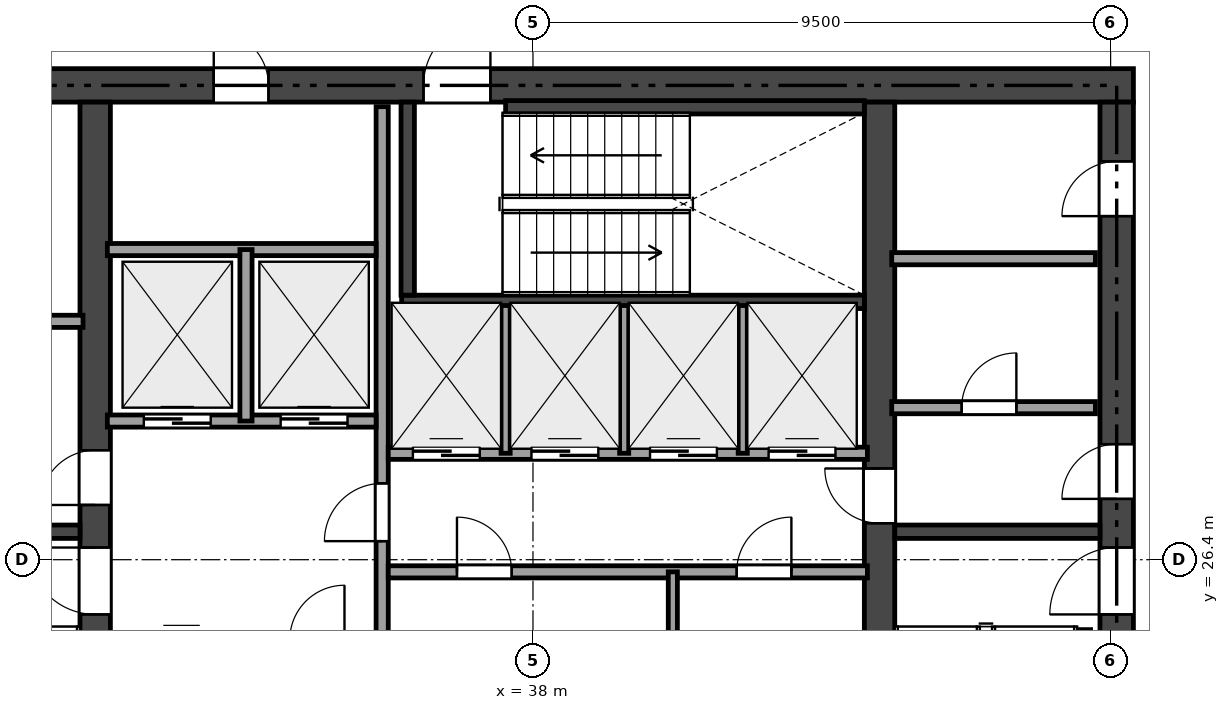
"""IFC4 building model, lengths in metres.
Left out: names, types, materials, properties, quantities, classifications, styles, units other than length and angle.
Written with IfcOpenShell. Run it as: python <this file> out.ifc"""

import sys

from ifc_helpers import new_model, si_unit, direction, frame, frame_2d, origin, place, context, subcontext, project, spatial, rectangle, extrude, element, fill, save


model = new_model("IFC4")
c1 = context("Model", 3, precision=1e-05, world=origin(), true_north=direction((0.0, 1.0)))
c2 = subcontext(c1, "Body", "Model", "MODEL_VIEW")
j1 = project(units=[si_unit("LENGTHUNIT", "METRE"), si_unit("PLANEANGLEUNIT", "RADIAN")], contexts=[c1])
p1 = place(None, origin())
s1 = spatial("IfcSite", under=j1, at=p1, CompositionType="ELEMENT")
p2 = place(p1, origin())
s2 = spatial("IfcBuilding", under=s1, at=p2, CompositionType="ELEMENT")
p3 = place(p2, frame((0.0, 0.0, 279.3)))
s3 = spatial("IfcBuildingStorey", under=s2, at=p3, CompositionType="ELEMENT", Elevation=279.3)
p4 = place(p3, frame((26.525, 34.2, 0.0), z_axis=(0.0, 0.0, 1.0), x_axis=(1.0, 0.0, 0.0)))
e1 = element("IfcWall", 1, at=p4, inside=s3, PredefinedType="SHEAR", context=c2, shape_type="SweptSolid", body=[
    extrude(rectangle(XDim=21.35, YDim=0.55, at=frame_2d((10.675, 0.0))), origin(), (0.0, 0.0, 1.0), 3.84),
])
p5 = place(p4, frame((9.675, 0.0, 0.0)))
e2 = element("IfcOpeningElement", 2, at=p5, cuts=e1, PredefinedType="OPENING", context=c2, shape_type="SweptSolid", body=[
    extrude(rectangle(XDim=1.1, YDim=2.15, at=frame_2d((0.55, 1.075))), frame((0.0, 0.285, 0.0), z_axis=(0.0, -1.0, 0.0), x_axis=(1.0, 0.0, 0.0)), (0.0, 0.0, 1.0), 0.57),
])
p6 = place(p4, frame((1.925, 0.0, 0.0)))
e3 = element("IfcOpeningElement", 3, at=p6, cuts=e1, PredefinedType="OPENING", context=c2, shape_type="SweptSolid", body=[
    extrude(rectangle(XDim=0.9, YDim=2.1, at=frame_2d((0.45, 1.05))), frame((0.0, 0.285, 0.0), z_axis=(0.0, -1.0, 0.0), x_axis=(1.0, 0.0, 0.0)), (0.0, 0.0, 1.0), 0.57),
])
p7 = place(p4, frame((6.225, 0.0, 0.0)))
e4 = element("IfcOpeningElement", 4, at=p7, cuts=e1, PredefinedType="OPENING", context=c2, shape_type="SweptSolid", body=[
    extrude(rectangle(XDim=0.9, YDim=2.1, at=frame_2d((0.45, 1.05))), frame((0.0, 0.285, 0.0), z_axis=(0.0, -1.0, 0.0), x_axis=(1.0, 0.0, 0.0)), (0.0, 0.0, 1.0), 0.57),
])
p8 = place(p3, frame((47.6, 18.875, 0.0), z_axis=(0.0, 0.0, 1.0), x_axis=(0.0, 1.0, 0.0)))
e5 = element("IfcWall", 5, at=p8, inside=s3, PredefinedType="SHEAR", context=c2, shape_type="SweptSolid", body=[
    extrude(rectangle(XDim=15.05, YDim=0.55, at=frame_2d((7.525, 0.0))), origin(), (0.0, 0.0, 1.0), 3.84),
])
p9 = place(p8, frame((6.625, 0.0, 0.0)))
e6 = element("IfcOpeningElement", 6, at=p9, cuts=e5, PredefinedType="OPENING", context=c2, shape_type="SweptSolid", body=[
    extrude(rectangle(XDim=1.1, YDim=2.15, at=frame_2d((0.55, 1.075))), frame((0.0, 0.285, 0.0), z_axis=(0.0, -1.0, 0.0), x_axis=(1.0, 0.0, 0.0)), (0.0, 0.0, 1.0), 0.57),
])
p10 = place(p8, frame((8.525, 0.0, 0.0)))
e7 = element("IfcOpeningElement", 7, at=p10, cuts=e5, PredefinedType="OPENING", context=c2, shape_type="SweptSolid", body=[
    extrude(rectangle(XDim=0.9, YDim=2.1, at=frame_2d((0.45, 1.05))), frame((0.0, 0.285, 0.0), z_axis=(0.0, -1.0, 0.0), x_axis=(1.0, 0.0, 0.0)), (0.0, 0.0, 1.0), 0.57),
])
p11 = place(p8, frame((13.175, 0.0, 0.0)))
e8 = element("IfcOpeningElement", 8, at=p11, cuts=e5, PredefinedType="OPENING", context=c2, shape_type="SweptSolid", body=[
    extrude(rectangle(XDim=0.9, YDim=2.1, at=frame_2d((0.45, 1.05))), frame((0.0, 0.285, 0.0), z_axis=(0.0, -1.0, 0.0), x_axis=(1.0, 0.0, 0.0)), (0.0, 0.0, 1.0), 0.57),
])
p12 = place(p3, frame((30.8, 18.875, 0.0), z_axis=(0.0, 0.0, 1.0), x_axis=(0.0, 1.0, 0.0)))
e9 = element("IfcWall", 9, at=p12, inside=s3, PredefinedType="SHEAR", context=c2, shape_type="SweptSolid", body=[
    extrude(rectangle(XDim=15.05, YDim=0.5, at=frame_2d((7.525, 0.0))), origin(), (0.0, 0.0, 1.0), 3.84),
])
p13 = place(p12, frame((6.625, 0.0, 0.0)))
e10 = element("IfcOpeningElement", 10, at=p13, cuts=e9, PredefinedType="OPENING", context=c2, shape_type="SweptSolid", body=[
    extrude(rectangle(XDim=1.1, YDim=2.15, at=frame_2d((0.55, 1.075))), frame((0.0, 0.26, 0.0), z_axis=(0.0, -1.0, 0.0), x_axis=(1.0, 0.0, 0.0)), (0.0, 0.0, 1.0), 0.52),
])
p14 = place(p12, frame((8.425, 0.0, 0.0)))
e11 = element("IfcOpeningElement", 11, at=p14, cuts=e9, PredefinedType="OPENING", context=c2, shape_type="SweptSolid", body=[
    extrude(rectangle(XDim=0.9, YDim=2.1, at=frame_2d((0.45, 1.05))), frame((0.0, 0.26, 0.0), z_axis=(0.0, -1.0, 0.0), x_axis=(1.0, 0.0, 0.0)), (0.0, 0.0, 1.0), 0.52),
])
p15 = place(p3, frame((43.7, 18.875, 0.0), z_axis=(0.0, 0.0, 1.0), x_axis=(0.0, 1.0, 0.0)))
e12 = element("IfcWall", 12, at=p15, inside=s3, PredefinedType="SHEAR", context=c2, shape_type="SweptSolid", body=[
    extrude(rectangle(XDim=15.05, YDim=0.5, at=frame_2d((7.525, 0.0))), origin(), (0.0, 0.0, 1.0), 3.84),
])
p16 = place(p15, frame((8.125, 0.0, 0.0)))
e13 = element("IfcOpeningElement", 13, at=p16, cuts=e12, PredefinedType="OPENING", context=c2, shape_type="SweptSolid", body=[
    extrude(rectangle(XDim=0.9, YDim=2.1, at=frame_2d((0.45, 1.05))), frame((0.0, 0.26, 0.0), z_axis=(0.0, -1.0, 0.0), x_axis=(1.0, 0.0, 0.0)), (0.0, 0.0, 1.0), 0.52),
])
p17 = place(p3, frame((27.075, 26.86, 0.0), z_axis=(0.0, 0.0, 1.0), x_axis=(1.0, 0.0, 0.0)))
e14 = element("IfcWall", 14, at=p17, inside=s3, PredefinedType="SHEAR", context=c2, shape_type="SweptSolid", body=[
    extrude(rectangle(XDim=3.475, YDim=0.22, at=frame_2d((1.738, 0.0))), origin(), (0.0, 0.0, 1.0), 3.84),
])
p18 = place(p3, frame((43.95, 26.86, 0.0), z_axis=(0.0, 0.0, 1.0), x_axis=(1.0, 0.0, 0.0)))
e15 = element("IfcWall", 15, at=p18, inside=s3, PredefinedType="SHEAR", context=c2, shape_type="SweptSolid", body=[
    extrude(rectangle(XDim=3.375, YDim=0.22, at=frame_2d((1.688, 0.0))), origin(), (0.0, 0.0, 1.0), 3.84),
])
p19 = place(p3, frame((35.84, 30.64, 0.0), z_axis=(0.0, 0.0, 1.0), x_axis=(1.0, 0.0, 0.0)))
e16 = element("IfcWall", 16, at=p19, inside=s3, PredefinedType="SHEAR", context=c2, shape_type="SweptSolid", body=[
    extrude(rectangle(XDim=7.61, YDim=0.22, at=frame_2d((3.805, 0.0))), origin(), (0.0, 0.0, 1.0), 3.84),
])
p20 = place(p3, frame((35.94, 30.75, 0.0), z_axis=(0.0, 0.0, 1.0), x_axis=(0.0, 1.0, 0.0)))
e17 = element("IfcWall", 17, at=p20, inside=s3, PredefinedType="SHEAR", context=c2, shape_type="SweptSolid", body=[
    extrude(rectangle(XDim=3.175, YDim=0.22, at=frame_2d((1.587, 0.0))), origin(), (0.0, 0.0, 1.0), 3.84),
])
p21 = place(p3, frame((37.55, 33.84, 0.0), z_axis=(0.0, 0.0, 1.0), x_axis=(1.0, 0.0, 0.0)))
e18 = element("IfcWall", 18, at=p21, inside=s3, PredefinedType="SHEAR", context=c2, shape_type="SweptSolid", body=[
    extrude(rectangle(XDim=5.9, YDim=0.22, at=frame_2d((2.95, 0.0))), origin(), (0.0, 0.0, 1.0), 3.84),
])
p22 = place(p3, frame((27.15, 30.32, 0.0), z_axis=(0.0, 0.0, 1.0), x_axis=(1.0, 0.0, 0.0)))
e19 = element("IfcWall", 19, at=p22, inside=s3, PredefinedType="SOLIDWALL", context=c2, shape_type="SweptSolid", body=[
    extrude(rectangle(XDim=3.45, YDim=0.2, at=frame_2d((1.725, 0.0))), origin(), (0.0, 0.0, 1.0), 3.513),
])
p23 = place(p3, frame((43.9, 28.9, 0.0), z_axis=(0.0, 0.0, 1.0), x_axis=(1.0, 0.0, 0.0)))
e20 = element("IfcWall", 20, at=p23, inside=s3, PredefinedType="SOLIDWALL", context=c2, shape_type="SweptSolid", body=[
    extrude(rectangle(XDim=3.35, YDim=0.2, at=frame_2d((1.675, 0.0))), origin(), (0.0, 0.0, 1.0), 3.84),
])
p24 = place(p23, frame((1.15, 0.0, 0.0)))
e21 = element("IfcOpeningElement", 21, at=p24, cuts=e20, PredefinedType="OPENING", context=c2, shape_type="SweptSolid", body=[
    extrude(rectangle(XDim=0.9, YDim=2.1, at=frame_2d((0.45, 1.05))), frame((0.0, 0.11, 0.0), z_axis=(0.0, -1.0, 0.0), x_axis=(1.0, 0.0, 0.0)), (0.0, 0.0, 1.0), 0.22),
])
p25 = place(p3, frame((43.9, 31.35, 0.0), z_axis=(0.0, 0.0, 1.0), x_axis=(1.0, 0.0, 0.0)))
e22 = element("IfcWall", 22, at=p25, inside=s3, PredefinedType="SOLIDWALL", context=c2, shape_type="SweptSolid", body=[
    extrude(rectangle(XDim=3.35, YDim=0.2, at=frame_2d((1.675, 0.0))), origin(), (0.0, 0.0, 1.0), 3.513),
])
p26 = place(p3, frame((35.52, 18.95, 0.0), z_axis=(0.0, 0.0, 1.0), x_axis=(0.0, 1.0, 0.0)))
e23 = element("IfcWall", 23, at=p26, inside=s3, PredefinedType="SOLIDWALL", context=c2, shape_type="SweptSolid", body=[
    extrude(rectangle(XDim=14.9, YDim=0.2, at=frame_2d((7.45, 0.0))), origin(), (0.0, 0.0, 1.0), 3.361),
])
p27 = place(p26, frame((7.755, 0.0, 0.0)))
e24 = element("IfcOpeningElement", 24, at=p27, cuts=e23, PredefinedType="OPENING", context=c2, shape_type="SweptSolid", body=[
    extrude(rectangle(XDim=0.95, YDim=2.15, at=frame_2d((0.475, 1.075))), frame((0.0, 0.11, 0.0), z_axis=(0.0, -1.0, 0.0), x_axis=(1.0, 0.0, 0.0)), (0.0, 0.0, 1.0), 0.22),
])
p28 = place(p26, frame((0.6, 0.0, 0.0)))
e25 = element("IfcOpeningElement", 25, at=p28, cuts=e23, PredefinedType="OPENING", context=c2, shape_type="SweptSolid", body=[
    extrude(rectangle(XDim=0.9, YDim=2.1, at=frame_2d((0.45, 1.05))), frame((0.0, 0.11, 0.0), z_axis=(0.0, -1.0, 0.0), x_axis=(1.0, 0.0, 0.0)), (0.0, 0.0, 1.0), 0.22),
])
p29 = place(p3, frame((31.0, 28.68, 0.0), z_axis=(0.0, 0.0, 1.0), x_axis=(1.0, 0.0, 0.0)))
e26 = element("IfcWall", 26, at=p29, inside=s3, PredefinedType="SOLIDWALL", context=c2, shape_type="SweptSolid", body=[
    extrude(rectangle(XDim=4.42, YDim=0.2, at=frame_2d((2.21, 0.0))), origin(), (0.0, 0.0, 1.0), 3.84),
])
p30 = place(p29, frame((0.6, 0.0, 0.0)))
e27 = element("IfcOpeningElement", 27, at=p30, cuts=e26, PredefinedType="OPENING", context=c2, shape_type="SweptSolid", body=[
    extrude(rectangle(XDim=1.1, YDim=2.15, at=frame_2d((0.55, 1.075))), frame((0.0, 0.11, 0.0), z_axis=(0.0, -1.0, 0.0), x_axis=(1.0, 0.0, 0.0)), (0.0, 0.0, 1.0), 0.22),
])
p31 = place(p29, frame((2.85, 0.0, 0.0)))
e28 = element("IfcOpeningElement", 28, at=p31, cuts=e26, PredefinedType="OPENING", context=c2, shape_type="SweptSolid", body=[
    extrude(rectangle(XDim=1.1, YDim=2.15, at=frame_2d((0.55, 1.075))), frame((0.0, 0.11, 0.0), z_axis=(0.0, -1.0, 0.0), x_axis=(1.0, 0.0, 0.0)), (0.0, 0.0, 1.0), 0.22),
])
p32 = place(p3, frame((31.0, 31.5, 0.0), z_axis=(0.0, 0.0, 1.0), x_axis=(1.0, 0.0, 0.0)))
e29 = element("IfcWall", 29, at=p32, inside=s3, PredefinedType="SOLIDWALL", context=c2, shape_type="SweptSolid", body=[
    extrude(rectangle(XDim=4.42, YDim=0.2, at=frame_2d((2.21, 0.0))), origin(), (0.0, 0.0, 1.0), 3.84),
])
p33 = place(p3, frame((33.28, 28.68, 0.0), z_axis=(0.0, 0.0, 1.0), x_axis=(0.0, 1.0, 0.0)))
e30 = element("IfcWall", 30, at=p33, inside=s3, PredefinedType="SOLIDWALL", context=c2, shape_type="SweptSolid", body=[
    extrude(rectangle(XDim=2.82, YDim=0.2, at=frame_2d((1.41, 0.0))), origin(), (0.0, 0.0, 1.0), 3.84),
])
p34 = place(p3, frame((35.62, 28.15, 0.0), z_axis=(0.0, 0.0, 1.0), x_axis=(1.0, 0.0, 0.0)))
e31 = element("IfcWall", 31, at=p34, inside=s3, PredefinedType="SOLIDWALL", context=c2, shape_type="SweptSolid", body=[
    extrude(rectangle(XDim=7.88, YDim=0.2, at=frame_2d((3.94, 0.0))), origin(), (0.0, 0.0, 1.0), 3.84),
])
p35 = place(p34, frame((0.405, 0.0, 0.0)))
e32 = element("IfcOpeningElement", 32, at=p35, cuts=e31, PredefinedType="OPENING", context=c2, shape_type="SweptSolid", body=[
    extrude(rectangle(XDim=1.1, YDim=2.15, at=frame_2d((0.55, 1.075))), frame((0.0, 0.11, 0.0), z_axis=(0.0, -1.0, 0.0), x_axis=(1.0, 0.0, 0.0)), (0.0, 0.0, 1.0), 0.22),
])
p36 = place(p34, frame((2.355, 0.0, 0.0)))
e33 = element("IfcOpeningElement", 33, at=p36, cuts=e31, PredefinedType="OPENING", context=c2, shape_type="SweptSolid", body=[
    extrude(rectangle(XDim=1.1, YDim=2.15, at=frame_2d((0.55, 1.075))), frame((0.0, 0.11, 0.0), z_axis=(0.0, -1.0, 0.0), x_axis=(1.0, 0.0, 0.0)), (0.0, 0.0, 1.0), 0.22),
])
p37 = place(p34, frame((4.305, 0.0, 0.0)))
e34 = element("IfcOpeningElement", 34, at=p37, cuts=e31, PredefinedType="OPENING", context=c2, shape_type="SweptSolid", body=[
    extrude(rectangle(XDim=1.1, YDim=2.15, at=frame_2d((0.55, 1.075))), frame((0.0, 0.11, 0.0), z_axis=(0.0, -1.0, 0.0), x_axis=(1.0, 0.0, 0.0)), (0.0, 0.0, 1.0), 0.22),
])
p38 = place(p34, frame((6.255, 0.0, 0.0)))
e35 = element("IfcOpeningElement", 35, at=p38, cuts=e31, PredefinedType="OPENING", context=c2, shape_type="SweptSolid", body=[
    extrude(rectangle(XDim=1.1, YDim=2.15, at=frame_2d((0.55, 1.075))), frame((0.0, 0.11, 0.0), z_axis=(0.0, -1.0, 0.0), x_axis=(1.0, 0.0, 0.0)), (0.0, 0.0, 1.0), 0.22),
])
p39 = place(p3, frame((35.62, 26.2, 0.0), z_axis=(0.0, 0.0, 1.0), x_axis=(1.0, 0.0, 0.0)))
e36 = element("IfcWall", 36, at=p39, inside=s3, PredefinedType="SOLIDWALL", context=c2, shape_type="SweptSolid", body=[
    extrude(rectangle(XDim=7.88, YDim=0.2, at=frame_2d((3.94, 0.0))), origin(), (0.0, 0.0, 1.0), 3.84),
])
p40 = place(p39, frame((1.13, 0.0, 0.0)))
e37 = element("IfcOpeningElement", 37, at=p40, cuts=e36, PredefinedType="OPENING", context=c2, shape_type="SweptSolid", body=[
    extrude(rectangle(XDim=0.9, YDim=2.1, at=frame_2d((0.45, 1.05))), frame((0.0, 0.11, 0.0), z_axis=(0.0, -1.0, 0.0), x_axis=(1.0, 0.0, 0.0)), (0.0, 0.0, 1.0), 0.22),
])
p41 = place(p39, frame((5.73, 0.0, 0.0)))
e38 = element("IfcOpeningElement", 38, at=p41, cuts=e36, PredefinedType="OPENING", context=c2, shape_type="SweptSolid", body=[
    extrude(rectangle(XDim=0.9, YDim=2.1, at=frame_2d((0.45, 1.05))), frame((0.0, 0.11, 0.0), z_axis=(0.0, -1.0, 0.0), x_axis=(1.0, 0.0, 0.0)), (0.0, 0.0, 1.0), 0.22),
])
for number, where, z_axis, x_axis in (
    (39, (37.55, 28.15, 0.0), (0.0, 0.0, 1.0), (0.0, 1.0, 0.0)),
    (40, (39.5, 28.15, 0.0), (0.0, 0.0, 1.0), (0.0, 1.0, 0.0)),
    (41, (41.45, 28.15, 0.0), (0.0, 0.0, 1.0), (0.0, 1.0, 0.0)),
):
    element("IfcWall", number, at=place(p3, frame(where, z_axis=z_axis, x_axis=x_axis)), inside=s3, PredefinedType="PARTITIONING", context=c2, shape_type="SweptSolid", body=[
        extrude(rectangle(XDim=2.43, YDim=0.15, at=frame_2d((1.215, 0.0))), origin(), (0.0, 0.0, 1.0), 3.84),
    ])
p42 = place(p3, frame((40.3, 23.65, 0.0), z_axis=(0.0, 0.0, 1.0), x_axis=(0.0, 1.0, 0.0)))
e42 = element("IfcWall", 42, at=p42, inside=s3, PredefinedType="PARTITIONING", context=c2, shape_type="SweptSolid", body=[
    extrude(rectangle(XDim=2.55, YDim=0.15, at=frame_2d((1.275, 0.0))), origin(), (0.0, 0.0, 1.0), 3.361),
])
p43 = place(p13, origin())
e43 = element("IfcDoor", 43, at=p43, inside=s3, OperationType="SINGLE_SWING_RIGHT", PredefinedType="DOOR", context=c2, shape_type="SweptSolid", body=[
    extrude(rectangle(XDim=1.1, YDim=2.15, at=frame_2d((0.55, 1.075))), frame((0.0, 0.025, 0.0), z_axis=(0.0, -1.0, 0.0), x_axis=(1.0, 0.0, 0.0)), (0.0, 0.0, 1.0), 0.05),
])
fill(e10, e43)
p44 = place(p9, origin())
e44 = element("IfcDoor", 44, at=p44, inside=s3, OperationType="SINGLE_SWING_LEFT", PredefinedType="DOOR", context=c2, shape_type="SweptSolid", body=[
    extrude(rectangle(XDim=1.1, YDim=2.15, at=frame_2d((0.55, 1.075))), frame((0.0, 0.025, 0.0), z_axis=(0.0, -1.0, 0.0), x_axis=(1.0, 0.0, 0.0)), (0.0, 0.0, 1.0), 0.05),
])
fill(e6, e44)
p45 = place(p5, origin())
e45 = element("IfcDoor", 45, at=p45, inside=s3, OperationType="SINGLE_SWING_RIGHT", PredefinedType="DOOR", context=c2, shape_type="SweptSolid", body=[
    extrude(rectangle(XDim=1.1, YDim=2.15, at=frame_2d((0.55, 1.075))), frame((0.0, 0.025, 0.0), z_axis=(0.0, -1.0, 0.0), x_axis=(1.0, 0.0, 0.0)), (0.0, 0.0, 1.0), 0.05),
])
fill(e2, e45)
p46 = place(p27, origin())
e46 = element("IfcDoor", 46, at=p46, inside=s3, OperationType="SINGLE_SWING_LEFT", PredefinedType="DOOR", context=c2, shape_type="SweptSolid", body=[
    extrude(rectangle(XDim=0.95, YDim=2.15, at=frame_2d((0.475, 1.075))), frame((0.0, 0.025, 0.0), z_axis=(0.0, -1.0, 0.0), x_axis=(1.0, 0.0, 0.0)), (0.0, 0.0, 1.0), 0.05),
])
fill(e24, e46)
p47 = place(p16, origin())
e47 = element("IfcDoor", 47, at=p47, inside=s3, OperationType="SINGLE_SWING_RIGHT", PredefinedType="DOOR", context=c2, shape_type="SweptSolid", body=[
    extrude(rectangle(XDim=0.9, YDim=2.1, at=frame_2d((0.45, 1.05))), frame((0.0, 0.025, 0.0), z_axis=(0.0, -1.0, 0.0), x_axis=(1.0, 0.0, 0.0)), (0.0, 0.0, 1.0), 0.05),
])
fill(e13, e47)
p48 = place(p10, origin())
e48 = element("IfcDoor", 48, at=p48, inside=s3, OperationType="SINGLE_SWING_LEFT", PredefinedType="DOOR", context=c2, shape_type="SweptSolid", body=[
    extrude(rectangle(XDim=0.9, YDim=2.1, at=frame_2d((0.45, 1.05))), frame((0.0, 0.025, 0.0), z_axis=(0.0, -1.0, 0.0), x_axis=(1.0, 0.0, 0.0)), (0.0, 0.0, 1.0), 0.05),
])
fill(e7, e48)
p49 = place(p14, origin())
e49 = element("IfcDoor", 49, at=p49, inside=s3, OperationType="SINGLE_SWING_LEFT", PredefinedType="DOOR", context=c2, shape_type="SweptSolid", body=[
    extrude(rectangle(XDim=0.9, YDim=2.1, at=frame_2d((0.45, 1.05))), frame((0.0, 0.025, 0.0), z_axis=(0.0, -1.0, 0.0), x_axis=(1.0, 0.0, 0.0)), (0.0, 0.0, 1.0), 0.05),
])
fill(e11, e49)
p50 = place(p7, origin())
e50 = element("IfcDoor", 50, at=p50, inside=s3, OperationType="SINGLE_SWING_LEFT", PredefinedType="DOOR", context=c2, shape_type="SweptSolid", body=[
    extrude(rectangle(XDim=0.9, YDim=2.1, at=frame_2d((0.45, 1.05))), frame((0.0, 0.025, 0.0), z_axis=(0.0, -1.0, 0.0), x_axis=(1.0, 0.0, 0.0)), (0.0, 0.0, 1.0), 0.05),
])
fill(e4, e50)
p51 = place(p24, origin())
e51 = element("IfcDoor", 51, at=p51, inside=s3, OperationType="SINGLE_SWING_RIGHT", PredefinedType="DOOR", context=c2, shape_type="SweptSolid", body=[
    extrude(rectangle(XDim=0.9, YDim=2.1, at=frame_2d((0.45, 1.05))), frame((0.0, 0.025, 0.0), z_axis=(0.0, -1.0, 0.0), x_axis=(1.0, 0.0, 0.0)), (0.0, 0.0, 1.0), 0.05),
])
fill(e21, e51)
p52 = place(p11, origin())
e52 = element("IfcDoor", 52, at=p52, inside=s3, OperationType="SINGLE_SWING_LEFT", PredefinedType="DOOR", context=c2, shape_type="SweptSolid", body=[
    extrude(rectangle(XDim=0.9, YDim=2.1, at=frame_2d((0.45, 1.05))), frame((0.0, 0.025, 0.0), z_axis=(0.0, -1.0, 0.0), x_axis=(1.0, 0.0, 0.0)), (0.0, 0.0, 1.0), 0.05),
])
fill(e8, e52)
p53 = place(p40, origin())
e53 = element("IfcDoor", 53, at=p53, inside=s3, OperationType="SINGLE_SWING_LEFT", PredefinedType="DOOR", context=c2, shape_type="SweptSolid", body=[
    extrude(rectangle(XDim=0.9, YDim=2.1, at=frame_2d((0.45, 1.05))), frame((0.0, 0.025, 0.0), z_axis=(0.0, -1.0, 0.0), x_axis=(1.0, 0.0, 0.0)), (0.0, 0.0, 1.0), 0.05),
])
fill(e37, e53)
p54 = place(p41, origin())
e54 = element("IfcDoor", 54, at=p54, inside=s3, OperationType="SINGLE_SWING_RIGHT", PredefinedType="DOOR", context=c2, shape_type="SweptSolid", body=[
    extrude(rectangle(XDim=0.9, YDim=2.1, at=frame_2d((0.45, 1.05))), frame((0.0, 0.025, 0.0), z_axis=(0.0, -1.0, 0.0), x_axis=(1.0, 0.0, 0.0)), (0.0, 0.0, 1.0), 0.05),
])
fill(e38, e54)
p55 = place(p30, origin())
e55 = element("IfcDoor", 55, at=p55, inside=s3, OperationType="SLIDING_TO_LEFT", PredefinedType="DOOR", context=c2, shape_type="SweptSolid", body=[
    extrude(rectangle(XDim=1.1, YDim=2.15, at=frame_2d((0.55, 1.075))), frame((0.0, 0.025, 0.0), z_axis=(0.0, -1.0, 0.0), x_axis=(1.0, 0.0, 0.0)), (0.0, 0.0, 1.0), 0.05),
])
fill(e27, e55)
p56 = place(p31, origin())
e56 = element("IfcDoor", 56, at=p56, inside=s3, OperationType="SLIDING_TO_LEFT", PredefinedType="DOOR", context=c2, shape_type="SweptSolid", body=[
    extrude(rectangle(XDim=1.1, YDim=2.15, at=frame_2d((0.55, 1.075))), frame((0.0, 0.025, 0.0), z_axis=(0.0, -1.0, 0.0), x_axis=(1.0, 0.0, 0.0)), (0.0, 0.0, 1.0), 0.05),
])
fill(e28, e56)
p57 = place(p35, origin())
e57 = element("IfcDoor", 57, at=p57, inside=s3, OperationType="SLIDING_TO_LEFT", PredefinedType="DOOR", context=c2, shape_type="SweptSolid", body=[
    extrude(rectangle(XDim=1.1, YDim=2.15, at=frame_2d((0.55, 1.075))), frame((0.0, 0.025, 0.0), z_axis=(0.0, -1.0, 0.0), x_axis=(1.0, 0.0, 0.0)), (0.0, 0.0, 1.0), 0.05),
])
fill(e32, e57)
p58 = place(p36, origin())
e58 = element("IfcDoor", 58, at=p58, inside=s3, OperationType="SLIDING_TO_LEFT", PredefinedType="DOOR", context=c2, shape_type="SweptSolid", body=[
    extrude(rectangle(XDim=1.1, YDim=2.15, at=frame_2d((0.55, 1.075))), frame((0.0, 0.025, 0.0), z_axis=(0.0, -1.0, 0.0), x_axis=(1.0, 0.0, 0.0)), (0.0, 0.0, 1.0), 0.05),
])
fill(e33, e58)
p59 = place(p37, origin())
e59 = element("IfcDoor", 59, at=p59, inside=s3, OperationType="SLIDING_TO_LEFT", PredefinedType="DOOR", context=c2, shape_type="SweptSolid", body=[
    extrude(rectangle(XDim=1.1, YDim=2.15, at=frame_2d((0.55, 1.075))), frame((0.0, 0.025, 0.0), z_axis=(0.0, -1.0, 0.0), x_axis=(1.0, 0.0, 0.0)), (0.0, 0.0, 1.0), 0.05),
])
fill(e34, e59)
p60 = place(p38, origin())
e60 = element("IfcDoor", 60, at=p60, inside=s3, OperationType="SLIDING_TO_LEFT", PredefinedType="DOOR", context=c2, shape_type="SweptSolid", body=[
    extrude(rectangle(XDim=1.1, YDim=2.15, at=frame_2d((0.55, 1.075))), frame((0.0, 0.025, 0.0), z_axis=(0.0, -1.0, 0.0), x_axis=(1.0, 0.0, 0.0)), (0.0, 0.0, 1.0), 0.05),
])
fill(e35, e60)
save(model, sys.argv[1])
